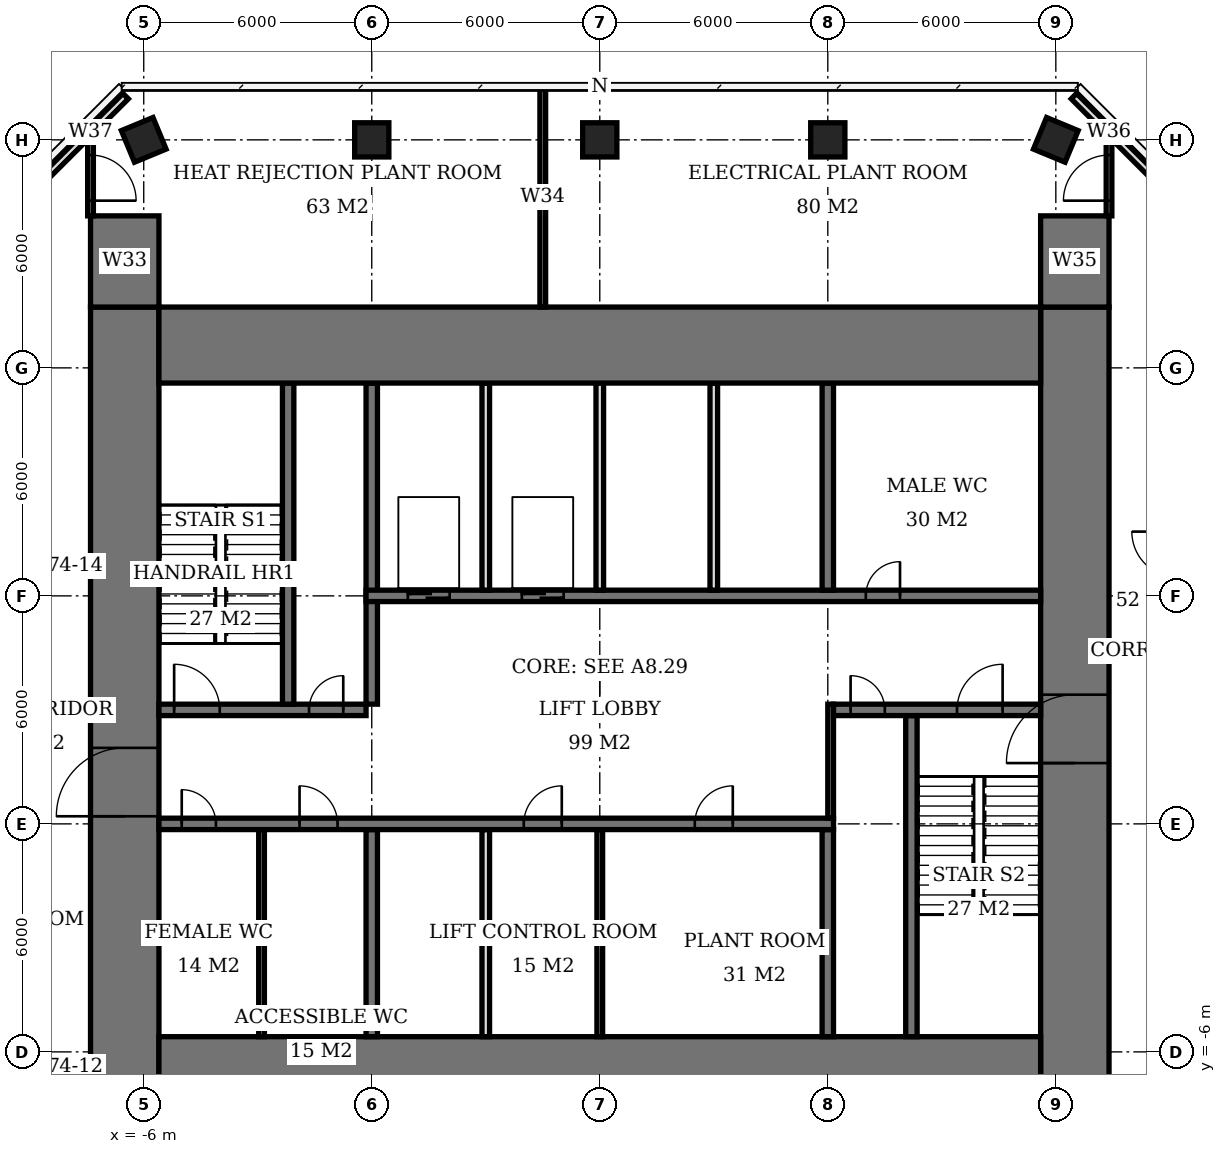
"""IFC4 building model, lengths in metres.
Left out: names, types, materials, properties, quantities, classifications, styles, units other than length and angle.
Written with IfcOpenShell. Run it as: python <this file> out.ifc"""

import sys

from ifc_helpers import new_model, si_unit, direction, frame, frame_2d, origin, origin_2d, place, context, subcontext, project, spatial, rectangle, extrude, element, fill, save


model = new_model("IFC4")
c1 = context("Model", 3, precision=1e-05, world=origin(), true_north=direction((0.0, 1.0)))
c2 = subcontext(c1, "Body", "Model", "MODEL_VIEW")
j1 = project(units=[si_unit("LENGTHUNIT", "METRE"), si_unit("PLANEANGLEUNIT", "RADIAN")], contexts=[c1])
p1 = place(None, origin())
s1 = spatial("IfcSite", under=j1, at=p1, CompositionType="ELEMENT")
p2 = place(p1, origin())
s2 = spatial("IfcBuilding", under=s1, at=p2, CompositionType="ELEMENT")
p3 = place(p2, frame((0.0, 0.0, 300.7)))
s3 = spatial("IfcBuildingStorey", under=s2, at=p3, CompositionType="ELEMENT", Elevation=300.7)
for number, where, z_axis, x_axis in (
    (1, (-6.0, 18.0, 0.0), (0.0, 0.0, 1.0), (0.924, 0.383, 0.0)),
    (2, (0.0, 18.0, 0.0), (0.0, 0.0, 1.0), (1.0, 0.0, 0.0)),
    (3, (6.0, 18.0, 0.0), (0.0, 0.0, 1.0), (1.0, 0.0, 0.0)),
    (4, (12.0, 18.0, 0.0), (0.0, 0.0, 1.0), (1.0, 0.0, 0.0)),
    (5, (18.0, 18.0, 0.0), (0.0, 0.0, 1.0), (0.924, -0.383, 0.0)),
):
    element("IfcColumn", number, at=place(p3, frame(where, z_axis=z_axis, x_axis=x_axis)), inside=s3, PredefinedType="COLUMN", context=c2, shape_type="SweptSolid", body=[
        extrude(rectangle(XDim=0.9, YDim=0.9, at=origin_2d()), origin(), (0.0, 0.0, 1.0), 5.0),
    ])
for number, where, z_axis, x_axis in (
    (6, (-5.6, -6.6, 0.0), (0.0, 0.0, 1.0), (1.0, 0.0, 0.0)),
    (7, (-5.6, 12.6, 0.0), (0.0, 0.0, 1.0), (1.0, 0.0, 0.0)),
):
    element("IfcWall", number, at=place(p3, frame(where, z_axis=z_axis, x_axis=x_axis)), inside=s3, PredefinedType="SHEAR", context=c2, shape_type="SweptSolid", body=[
        extrude(rectangle(XDim=23.2, YDim=2.0, at=frame_2d((11.6, 0.0))), origin(), (0.0, 0.0, 1.0), 5.0),
    ])
p4 = place(p3, frame((-6.5, -7.6, 0.0), z_axis=(0.0, 0.0, 1.0), x_axis=(0.0, 1.0, 0.0)))
e8 = element("IfcWall", 8, at=p4, inside=s3, PredefinedType="SHEAR", context=c2, shape_type="SweptSolid", body=[
    extrude(rectangle(XDim=21.2, YDim=1.8, at=frame_2d((10.6, 0.0))), origin(), (0.0, 0.0, 1.0), 5.0),
])
p5 = place(p4, frame((7.8, 0.0, 0.0)))
e9 = element("IfcOpeningElement", 9, at=p5, cuts=e8, PredefinedType="OPENING", context=c2, shape_type="SweptSolid", body=[
    extrude(rectangle(XDim=1.8, YDim=2.4, at=frame_2d((0.9, 1.2))), frame((0.0, 0.91, 0.0), z_axis=(0.0, -1.0, 0.0), x_axis=(1.0, 0.0, 0.0)), (0.0, 0.0, 1.0), 1.82),
])
p6 = place(p3, frame((18.5, -7.6, 0.0), z_axis=(0.0, 0.0, 1.0), x_axis=(0.0, 1.0, 0.0)))
e10 = element("IfcWall", 10, at=p6, inside=s3, PredefinedType="SHEAR", context=c2, shape_type="SweptSolid", body=[
    extrude(rectangle(XDim=21.2, YDim=1.8, at=frame_2d((10.6, 0.0))), origin(), (0.0, 0.0, 1.0), 5.0),
])
p7 = place(p6, frame((9.2, 0.0, 0.0)))
e11 = element("IfcOpeningElement", 11, at=p7, cuts=e10, PredefinedType="OPENING", context=c2, shape_type="SweptSolid", body=[
    extrude(rectangle(XDim=1.8, YDim=2.4, at=frame_2d((0.9, 1.2))), frame((0.0, 0.91, 0.0), z_axis=(0.0, -1.0, 0.0), x_axis=(1.0, 0.0, 0.0)), (0.0, 0.0, 1.0), 1.82),
])
for number, where, z_axis, x_axis in (
    (12, (-6.5, 13.6, 0.0), (0.0, 0.0, 1.0), (0.0, 1.0, 0.0)),
    (13, (18.5, 13.6, 0.0), (0.0, 0.0, 1.0), (0.0, 1.0, 0.0)),
):
    element("IfcWall", number, at=place(p3, frame(where, z_axis=z_axis, x_axis=x_axis)), inside=s3, PredefinedType="SHEAR", context=c2, shape_type="SweptSolid", body=[
        extrude(rectangle(XDim=2.4, YDim=1.8, at=frame_2d((1.2, 0.0))), origin(), (0.0, 0.0, 1.0), 5.0),
    ])
p8 = place(p3, frame((-5.6, 0.0, 0.0), z_axis=(0.0, 0.0, 1.0), x_axis=(1.0, 0.0, 0.0)))
e14 = element("IfcWall", 14, at=p8, inside=s3, PredefinedType="SHEAR", context=c2, shape_type="SweptSolid", body=[
    extrude(rectangle(XDim=17.75, YDim=0.3, at=frame_2d((8.875, 0.0))), origin(), (0.0, 0.0, 1.0), 5.0),
])
p9 = place(p8, frame((0.6, 0.0, 0.0)))
e15 = element("IfcOpeningElement", 15, at=p9, cuts=e14, PredefinedType="OPENING", context=c2, shape_type="SweptSolid", body=[
    extrude(rectangle(XDim=0.9, YDim=2.1, at=frame_2d((0.45, 1.05))), frame((0.0, 0.16, 0.0), z_axis=(0.0, -1.0, 0.0), x_axis=(1.0, 0.0, 0.0)), (0.0, 0.0, 1.0), 0.32),
])
p10 = place(p8, frame((3.7, 0.0, 0.0)))
e16 = element("IfcOpeningElement", 16, at=p10, cuts=e14, PredefinedType="OPENING", context=c2, shape_type="SweptSolid", body=[
    extrude(rectangle(XDim=1.0, YDim=2.1, at=frame_2d((0.5, 1.05))), frame((0.0, 0.16, 0.0), z_axis=(0.0, -1.0, 0.0), x_axis=(1.0, 0.0, 0.0)), (0.0, 0.0, 1.0), 0.32),
])
p11 = place(p8, frame((9.6, 0.0, 0.0)))
e17 = element("IfcOpeningElement", 17, at=p11, cuts=e14, PredefinedType="OPENING", context=c2, shape_type="SweptSolid", body=[
    extrude(rectangle(XDim=1.0, YDim=2.1, at=frame_2d((0.5, 1.05))), frame((0.0, 0.16, 0.0), z_axis=(0.0, -1.0, 0.0), x_axis=(1.0, 0.0, 0.0)), (0.0, 0.0, 1.0), 0.32),
])
p12 = place(p8, frame((14.1, 0.0, 0.0)))
e18 = element("IfcOpeningElement", 18, at=p12, cuts=e14, PredefinedType="OPENING", context=c2, shape_type="SweptSolid", body=[
    extrude(rectangle(XDim=1.0, YDim=2.1, at=frame_2d((0.5, 1.05))), frame((0.0, 0.16, 0.0), z_axis=(0.0, -1.0, 0.0), x_axis=(1.0, 0.0, 0.0)), (0.0, 0.0, 1.0), 0.32),
])
p13 = place(p3, frame((-5.6, 3.0, 0.0), z_axis=(0.0, 0.0, 1.0), x_axis=(1.0, 0.0, 0.0)))
e19 = element("IfcWall", 19, at=p13, inside=s3, PredefinedType="SHEAR", context=c2, shape_type="SweptSolid", body=[
    extrude(rectangle(XDim=5.45, YDim=0.3, at=frame_2d((2.725, 0.0))), origin(), (0.0, 0.0, 1.0), 5.0),
])
p14 = place(p13, frame((0.4, 0.0, 0.0)))
e20 = element("IfcOpeningElement", 20, at=p14, cuts=e19, PredefinedType="OPENING", context=c2, shape_type="SweptSolid", body=[
    extrude(rectangle(XDim=1.2, YDim=2.1, at=frame_2d((0.6, 1.05))), frame((0.0, 0.16, 0.0), z_axis=(0.0, -1.0, 0.0), x_axis=(1.0, 0.0, 0.0)), (0.0, 0.0, 1.0), 0.32),
])
p15 = place(p13, frame((3.95, 0.0, 0.0)))
e21 = element("IfcOpeningElement", 21, at=p15, cuts=e19, PredefinedType="OPENING", context=c2, shape_type="SweptSolid", body=[
    extrude(rectangle(XDim=0.9, YDim=2.1, at=frame_2d((0.45, 1.05))), frame((0.0, 0.16, 0.0), z_axis=(0.0, -1.0, 0.0), x_axis=(1.0, 0.0, 0.0)), (0.0, 0.0, 1.0), 0.32),
])
p16 = place(p3, frame((12.15, 3.0, 0.0), z_axis=(0.0, 0.0, 1.0), x_axis=(1.0, 0.0, 0.0)))
e22 = element("IfcWall", 22, at=p16, inside=s3, PredefinedType="SHEAR", context=c2, shape_type="SweptSolid", body=[
    extrude(rectangle(XDim=5.45, YDim=0.3, at=frame_2d((2.725, 0.0))), origin(), (0.0, 0.0, 1.0), 5.0),
])
p17 = place(p16, frame((3.25, 0.0, 0.0)))
e23 = element("IfcOpeningElement", 23, at=p17, cuts=e22, PredefinedType="OPENING", context=c2, shape_type="SweptSolid", body=[
    extrude(rectangle(XDim=1.2, YDim=2.1, at=frame_2d((0.6, 1.05))), frame((0.0, 0.16, 0.0), z_axis=(0.0, -1.0, 0.0), x_axis=(1.0, 0.0, 0.0)), (0.0, 0.0, 1.0), 0.32),
])
p18 = place(p16, frame((0.45, 0.0, 0.0)))
e24 = element("IfcOpeningElement", 24, at=p18, cuts=e22, PredefinedType="OPENING", context=c2, shape_type="SweptSolid", body=[
    extrude(rectangle(XDim=0.9, YDim=2.1, at=frame_2d((0.45, 1.05))), frame((0.0, 0.16, 0.0), z_axis=(0.0, -1.0, 0.0), x_axis=(1.0, 0.0, 0.0)), (0.0, 0.0, 1.0), 0.32),
])
p19 = place(p3, frame((-0.15, 6.0, 0.0), z_axis=(0.0, 0.0, 1.0), x_axis=(1.0, 0.0, 0.0)))
e25 = element("IfcWall", 25, at=p19, inside=s3, PredefinedType="SHEAR", context=c2, shape_type="SweptSolid", body=[
    extrude(rectangle(XDim=17.75, YDim=0.3, at=frame_2d((8.875, 0.0))), origin(), (0.0, 0.0, 1.0), 5.0),
])
p20 = place(p19, frame((13.15, 0.0, 0.0)))
e26 = element("IfcOpeningElement", 26, at=p20, cuts=e25, PredefinedType="OPENING", context=c2, shape_type="SweptSolid", body=[
    extrude(rectangle(XDim=0.9, YDim=2.1, at=frame_2d((0.45, 1.05))), frame((0.0, 0.16, 0.0), z_axis=(0.0, -1.0, 0.0), x_axis=(1.0, 0.0, 0.0)), (0.0, 0.0, 1.0), 0.32),
])
p21 = place(p19, frame((1.1, 0.0, 0.0)))
e27 = element("IfcOpeningElement", 27, at=p21, cuts=e25, PredefinedType="OPENING", context=c2, shape_type="SweptSolid", body=[
    extrude(rectangle(XDim=1.1, YDim=2.1, at=frame_2d((0.55, 1.05))), frame((0.0, 0.16, 0.0), z_axis=(0.0, -1.0, 0.0), x_axis=(1.0, 0.0, 0.0)), (0.0, 0.0, 1.0), 0.32),
])
p22 = place(p19, frame((4.1, 0.0, 0.0)))
e28 = element("IfcOpeningElement", 28, at=p22, cuts=e25, PredefinedType="OPENING", context=c2, shape_type="SweptSolid", body=[
    extrude(rectangle(XDim=1.1, YDim=2.1, at=frame_2d((0.55, 1.05))), frame((0.0, 0.16, 0.0), z_axis=(0.0, -1.0, 0.0), x_axis=(1.0, 0.0, 0.0)), (0.0, 0.0, 1.0), 0.32),
])
p23 = place(p3, frame((0.0, -5.6, 0.0), z_axis=(0.0, 0.0, 1.0), x_axis=(0.0, 1.0, 0.0)))
e29 = element("IfcWall", 29, at=p23, inside=s3, PredefinedType="SHEAR", context=c2, shape_type="SweptSolid", body=[
    extrude(rectangle(XDim=5.45, YDim=0.3, at=frame_2d((2.725, 0.0))), origin(), (0.0, 0.0, 1.0), 5.0),
])
p24 = place(p3, frame((0.0, 3.15, 0.0), z_axis=(0.0, 0.0, 1.0), x_axis=(0.0, 1.0, 0.0)))
e30 = element("IfcWall", 30, at=p24, inside=s3, PredefinedType="SHEAR", context=c2, shape_type="SweptSolid", body=[
    extrude(rectangle(XDim=8.45, YDim=0.3, at=frame_2d((4.225, 0.0))), origin(), (0.0, 0.0, 1.0), 5.0),
])
for number, where, z_axis, x_axis in (
    (31, (12.0, -5.6, 0.0), (0.0, 0.0, 1.0), (0.0, 1.0, 0.0)),
    (32, (12.0, 6.15, 0.0), (0.0, 0.0, 1.0), (0.0, 1.0, 0.0)),
):
    element("IfcWall", number, at=place(p3, frame(where, z_axis=z_axis, x_axis=x_axis)), inside=s3, PredefinedType="SHEAR", context=c2, shape_type="SweptSolid", body=[
        extrude(rectangle(XDim=5.45, YDim=0.3, at=frame_2d((2.725, 0.0))), origin(), (0.0, 0.0, 1.0), 5.0),
    ])
for number, where, z_axis, x_axis in (
    (33, (-2.2, 3.15, 0.0), (0.0, 0.0, 1.0), (0.0, 1.0, 0.0)),
    (34, (14.2, -5.6, 0.0), (0.0, 0.0, 1.0), (0.0, 1.0, 0.0)),
):
    element("IfcWall", number, at=place(p3, frame(where, z_axis=z_axis, x_axis=x_axis)), inside=s3, PredefinedType="SHEAR", context=c2, shape_type="SweptSolid", body=[
        extrude(rectangle(XDim=8.45, YDim=0.3, at=frame_2d((4.225, 0.0))), origin(), (0.0, 0.0, 1.0), 5.0),
    ])
for number, where, z_axis, x_axis in (
    (35, (3.0, 6.15, 0.0), (0.0, 0.0, 1.0), (0.0, 1.0, 0.0)),
    (36, (6.0, 6.15, 0.0), (0.0, 0.0, 1.0), (0.0, 1.0, 0.0)),
    (37, (9.0, 6.15, 0.0), (0.0, 0.0, 1.0), (0.0, 1.0, 0.0)),
    (38, (3.0, -5.6, 0.0), (0.0, 0.0, 1.0), (0.0, 1.0, 0.0)),
):
    element("IfcWall", number, at=place(p3, frame(where, z_axis=z_axis, x_axis=x_axis)), inside=s3, PredefinedType="SOLIDWALL", context=c2, shape_type="SweptSolid", body=[
        extrude(rectangle(XDim=5.45, YDim=0.2, at=frame_2d((2.725, 0.0))), origin(), (0.0, 0.0, 1.0), 5.0),
    ])
for number, where, z_axis, x_axis in (
    (39, (25.15, -6.476, 6.1), (0.0, 0.0, 1.0), (-0.707, -0.707, 0.0)),
    (40, (18.476, 19.15, 6.1), (0.0, 0.0, 1.0), (0.707, -0.707, 0.0)),
    (41, (-13.15, 12.476, 6.1), (0.0, 0.0, 1.0), (0.707, 0.707, 0.0)),
    (42, (-6.476, -13.15, 6.1), (0.0, 0.0, 1.0), (-0.707, 0.707, 0.0)),
):
    element("IfcWall", number, at=place(p3, frame(where, z_axis=z_axis, x_axis=x_axis)), inside=s3, PredefinedType="USERDEFINED", context=c2, shape_type="SweptSolid", body=[
        extrude(rectangle(XDim=9.438, YDim=0.2, at=frame_2d((4.719, 0.0))), origin(), (0.0, 0.0, 1.0), 1.9),
    ])
p25 = place(p3, frame((-2.9, -5.6, 0.0), z_axis=(0.0, 0.0, 1.0), x_axis=(0.0, 1.0, 0.0)))
e43 = element("IfcWall", 43, at=p25, inside=s3, PredefinedType="PLUMBINGWALL", context=c2, shape_type="SweptSolid", body=[
    extrude(rectangle(XDim=5.45, YDim=0.15, at=frame_2d((2.725, 0.0))), origin(), (0.0, 0.0, 1.0), 4.75),
])
p26 = place(p3, frame((6.0, -5.6, 0.0), z_axis=(0.0, 0.0, 1.0), x_axis=(0.0, 1.0, 0.0)))
e44 = element("IfcWall", 44, at=p26, inside=s3, PredefinedType="PARTITIONING", context=c2, shape_type="SweptSolid", body=[
    extrude(rectangle(XDim=5.45, YDim=0.15, at=frame_2d((2.725, 0.0))), origin(), (0.0, 0.0, 1.0), 4.75),
])
p27 = place(p3, frame((-7.4, 18.439, 0.0), z_axis=(0.0, 0.0, 1.0), x_axis=(0.0, -1.0, 0.0)))
e45 = element("IfcWall", 45, at=p27, inside=s3, PredefinedType="PARTITIONING", context=c2, shape_type="SweptSolid", body=[
    extrude(rectangle(XDim=2.439, YDim=0.15, at=frame_2d((1.219, 0.0))), origin(), (0.0, 0.0, 1.0), 4.75),
])
p28 = place(p27, frame((0.839, 0.0, 0.0)))
e46 = element("IfcOpeningElement", 46, at=p28, cuts=e45, PredefinedType="OPENING", context=c2, shape_type="SweptSolid", body=[
    extrude(rectangle(XDim=1.2, YDim=2.4, at=frame_2d((0.6, 1.2))), frame((0.0, 0.085, 0.0), z_axis=(0.0, -1.0, 0.0), x_axis=(1.0, 0.0, 0.0)), (0.0, 0.0, 1.0), 0.17),
])
p29 = place(p3, frame((4.5, 13.6, 0.0), z_axis=(0.0, 0.0, 1.0), x_axis=(0.0, 1.0, 0.0)))
e47 = element("IfcWall", 47, at=p29, inside=s3, PredefinedType="PARTITIONING", context=c2, shape_type="SweptSolid", body=[
    extrude(rectangle(XDim=5.8, YDim=0.15, at=frame_2d((2.9, 0.0))), origin(), (0.0, 0.0, 1.0), 4.75),
])
p30 = place(p3, frame((19.4, 16.0, 0.0), z_axis=(0.0, 0.0, 1.0), x_axis=(0.0, 1.0, 0.0)))
e48 = element("IfcWall", 48, at=p30, inside=s3, PredefinedType="PARTITIONING", context=c2, shape_type="SweptSolid", body=[
    extrude(rectangle(XDim=2.439, YDim=0.15, at=frame_2d((1.219, 0.0))), origin(), (0.0, 0.0, 1.0), 4.75),
])
p31 = place(p30, frame((0.4, 0.0, 0.0)))
e49 = element("IfcOpeningElement", 49, at=p31, cuts=e48, PredefinedType="OPENING", context=c2, shape_type="SweptSolid", body=[
    extrude(rectangle(XDim=1.2, YDim=2.4, at=frame_2d((0.6, 1.2))), frame((0.0, 0.085, 0.0), z_axis=(0.0, -1.0, 0.0), x_axis=(1.0, 0.0, 0.0)), (0.0, 0.0, 1.0), 0.17),
])
p32 = place(p3, frame((12.075, 0.15, 0.0), z_axis=(0.0, 0.0, 1.0), x_axis=(0.0, 1.0, 0.0)))
e50 = element("IfcWall", 50, at=p32, inside=s3, PredefinedType="PARTITIONING", context=c2, shape_type="SweptSolid", body=[
    extrude(rectangle(XDim=3.0, YDim=0.15, at=frame_2d((1.5, 0.0))), origin(), (0.0, 0.0, 1.0), 4.75),
])
p33 = place(p5, origin())
e51 = element("IfcDoor", 51, at=p33, inside=s3, OperationType="DOUBLE_DOOR_SINGLE_SWING", PredefinedType="DOOR", context=c2, shape_type="SweptSolid", body=[
    extrude(rectangle(XDim=1.8, YDim=2.4, at=frame_2d((0.9, 1.2))), frame((0.0, 0.025, 0.0), z_axis=(0.0, -1.0, 0.0), x_axis=(1.0, 0.0, 0.0)), (0.0, 0.0, 1.0), 0.05),
])
fill(e9, e51)
p34 = place(p7, origin())
e52 = element("IfcDoor", 52, at=p34, inside=s3, OperationType="DOUBLE_DOOR_SINGLE_SWING", PredefinedType="DOOR", context=c2, shape_type="SweptSolid", body=[
    extrude(rectangle(XDim=1.8, YDim=2.4, at=frame_2d((0.9, 1.2))), frame((0.0, 0.025, 0.0), z_axis=(0.0, -1.0, 0.0), x_axis=(1.0, 0.0, 0.0)), (0.0, 0.0, 1.0), 0.05),
])
fill(e11, e52)
p35 = place(p14, origin())
e53 = element("IfcDoor", 53, at=p35, inside=s3, OperationType="SINGLE_SWING_LEFT", PredefinedType="DOOR", context=c2, shape_type="SweptSolid", body=[
    extrude(rectangle(XDim=1.2, YDim=2.1, at=frame_2d((0.6, 1.05))), frame((0.0, 0.025, 0.0), z_axis=(0.0, -1.0, 0.0), x_axis=(1.0, 0.0, 0.0)), (0.0, 0.0, 1.0), 0.05),
])
fill(e20, e53)
p36 = place(p15, origin())
e54 = element("IfcDoor", 54, at=p36, inside=s3, OperationType="SINGLE_SWING_RIGHT", PredefinedType="DOOR", context=c2, shape_type="SweptSolid", body=[
    extrude(rectangle(XDim=0.9, YDim=2.1, at=frame_2d((0.45, 1.05))), frame((0.0, 0.025, 0.0), z_axis=(0.0, -1.0, 0.0), x_axis=(1.0, 0.0, 0.0)), (0.0, 0.0, 1.0), 0.05),
])
fill(e21, e54)
p37 = place(p17, origin())
e55 = element("IfcDoor", 55, at=p37, inside=s3, OperationType="SINGLE_SWING_RIGHT", PredefinedType="DOOR", context=c2, shape_type="SweptSolid", body=[
    extrude(rectangle(XDim=1.2, YDim=2.1, at=frame_2d((0.6, 1.05))), frame((0.0, 0.025, 0.0), z_axis=(0.0, -1.0, 0.0), x_axis=(1.0, 0.0, 0.0)), (0.0, 0.0, 1.0), 0.05),
])
fill(e23, e55)
p38 = place(p18, origin())
e56 = element("IfcDoor", 56, at=p38, inside=s3, OperationType="SINGLE_SWING_LEFT", PredefinedType="DOOR", context=c2, shape_type="SweptSolid", body=[
    extrude(rectangle(XDim=0.9, YDim=2.1, at=frame_2d((0.45, 1.05))), frame((0.0, 0.025, 0.0), z_axis=(0.0, -1.0, 0.0), x_axis=(1.0, 0.0, 0.0)), (0.0, 0.0, 1.0), 0.05),
])
fill(e24, e56)
p39 = place(p9, origin())
e57 = element("IfcDoor", 57, at=p39, inside=s3, OperationType="SINGLE_SWING_LEFT", PredefinedType="DOOR", context=c2, shape_type="SweptSolid", body=[
    extrude(rectangle(XDim=0.9, YDim=2.1, at=frame_2d((0.45, 1.05))), frame((0.0, 0.025, 0.0), z_axis=(0.0, -1.0, 0.0), x_axis=(1.0, 0.0, 0.0)), (0.0, 0.0, 1.0), 0.05),
])
fill(e15, e57)
p40 = place(p10, origin())
e58 = element("IfcDoor", 58, at=p40, inside=s3, OperationType="SINGLE_SWING_LEFT", PredefinedType="DOOR", context=c2, shape_type="SweptSolid", body=[
    extrude(rectangle(XDim=1.0, YDim=2.1, at=frame_2d((0.5, 1.05))), frame((0.0, 0.025, 0.0), z_axis=(0.0, -1.0, 0.0), x_axis=(1.0, 0.0, 0.0)), (0.0, 0.0, 1.0), 0.05),
])
fill(e16, e58)
p41 = place(p20, origin())
e59 = element("IfcDoor", 59, at=p41, inside=s3, OperationType="SINGLE_SWING_RIGHT", PredefinedType="DOOR", context=c2, shape_type="SweptSolid", body=[
    extrude(rectangle(XDim=0.9, YDim=2.1, at=frame_2d((0.45, 1.05))), frame((0.0, 0.025, 0.0), z_axis=(0.0, -1.0, 0.0), x_axis=(1.0, 0.0, 0.0)), (0.0, 0.0, 1.0), 0.05),
])
fill(e26, e59)
p42 = place(p11, origin())
e60 = element("IfcDoor", 60, at=p42, inside=s3, OperationType="SINGLE_SWING_RIGHT", PredefinedType="DOOR", context=c2, shape_type="SweptSolid", body=[
    extrude(rectangle(XDim=1.0, YDim=2.1, at=frame_2d((0.5, 1.05))), frame((0.0, 0.025, 0.0), z_axis=(0.0, -1.0, 0.0), x_axis=(1.0, 0.0, 0.0)), (0.0, 0.0, 1.0), 0.05),
])
fill(e17, e60)
p43 = place(p12, origin())
e61 = element("IfcDoor", 61, at=p43, inside=s3, OperationType="SINGLE_SWING_RIGHT", PredefinedType="DOOR", context=c2, shape_type="SweptSolid", body=[
    extrude(rectangle(XDim=1.0, YDim=2.1, at=frame_2d((0.5, 1.05))), frame((0.0, 0.025, 0.0), z_axis=(0.0, -1.0, 0.0), x_axis=(1.0, 0.0, 0.0)), (0.0, 0.0, 1.0), 0.05),
])
fill(e18, e61)
p44 = place(p21, origin())
e62 = element("IfcDoor", 62, at=p44, inside=s3, OperationType="DOUBLE_DOOR_SLIDING", PredefinedType="USERDEFINED", context=c2, shape_type="SweptSolid", body=[
    extrude(rectangle(XDim=1.1, YDim=2.1, at=frame_2d((0.55, 1.05))), frame((0.0, 0.025, 0.0), z_axis=(0.0, -1.0, 0.0), x_axis=(1.0, 0.0, 0.0)), (0.0, 0.0, 1.0), 0.05),
])
fill(e27, e62)
p45 = place(p22, origin())
e63 = element("IfcDoor", 63, at=p45, inside=s3, OperationType="DOUBLE_DOOR_SLIDING", PredefinedType="USERDEFINED", context=c2, shape_type="SweptSolid", body=[
    extrude(rectangle(XDim=1.1, YDim=2.1, at=frame_2d((0.55, 1.05))), frame((0.0, 0.025, 0.0), z_axis=(0.0, -1.0, 0.0), x_axis=(1.0, 0.0, 0.0)), (0.0, 0.0, 1.0), 0.05),
])
fill(e28, e63)
p46 = place(p31, origin())
e64 = element("IfcDoor", 64, at=p46, inside=s3, OperationType="SINGLE_SWING_LEFT", PredefinedType="DOOR", context=c2, shape_type="SweptSolid", body=[
    extrude(rectangle(XDim=1.2, YDim=2.4, at=frame_2d((0.6, 1.2))), frame((0.0, 0.025, 0.0), z_axis=(0.0, -1.0, 0.0), x_axis=(1.0, 0.0, 0.0)), (0.0, 0.0, 1.0), 0.05),
])
fill(e49, e64)
p47 = place(p28, origin())
e65 = element("IfcDoor", 65, at=p47, inside=s3, OperationType="SINGLE_SWING_RIGHT", PredefinedType="DOOR", context=c2, shape_type="SweptSolid", body=[
    extrude(rectangle(XDim=1.2, YDim=2.4, at=frame_2d((0.6, 1.2))), frame((0.0, 0.025, 0.0), z_axis=(0.0, -1.0, 0.0), x_axis=(1.0, 0.0, 0.0)), (0.0, 0.0, 1.0), 0.05),
])
fill(e46, e65)
save(model, sys.argv[1])
